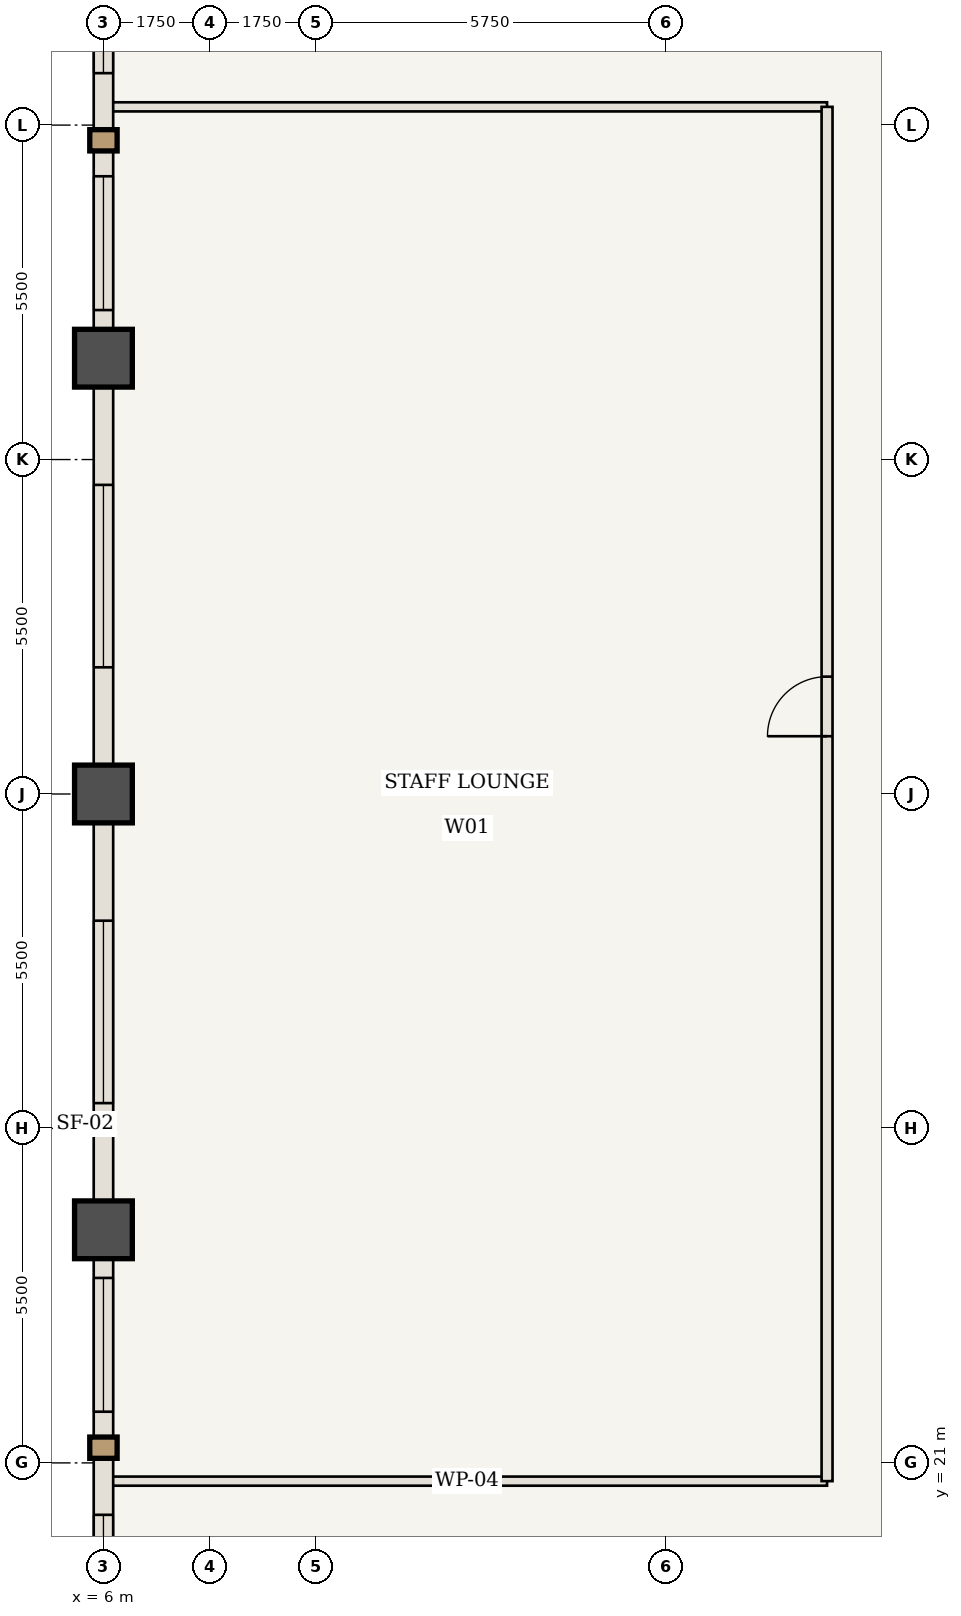
"""IFC4 building model, lengths in metres.
Left out: names, types, materials, properties, quantities, classifications, styles, units other than length and angle.
Written with IfcOpenShell. Run it as: python <this file> out.ifc"""

import sys

from ifc_helpers import new_model, si_unit, direction, frame, frame_2d, origin, origin_2d, place, context, subcontext, project, spatial, rectangle, extrude, element, fill, save


model = new_model("IFC4")
c1 = context("Model", 3, precision=1e-05, world=origin(), true_north=direction((0.0, 1.0)))
c2 = subcontext(c1, "Body", "Model", "MODEL_VIEW")
j1 = project(units=[si_unit("LENGTHUNIT", "METRE"), si_unit("PLANEANGLEUNIT", "RADIAN")], contexts=[c1])
p1 = place(None, origin())
s1 = spatial("IfcSite", under=j1, at=p1, CompositionType="ELEMENT")
p2 = place(p1, origin())
s2 = spatial("IfcBuilding", under=s1, at=p2, CompositionType="ELEMENT")
p3 = place(p2, frame((0.0, 0.0, 149.1)))
s3 = spatial("IfcBuildingStorey", under=s2, at=p3, CompositionType="ELEMENT", Elevation=149.1)
for number, where, z_axis, x_axis in (
    (1, (6.0, 24.833, 0.0), (0.0, 0.0, 1.0), (1.0, 0.0, 0.0)),
    (2, (6.0, 32.0, 0.0), (0.0, 0.0, 1.0), (1.0, 0.0, 0.0)),
    (3, (6.0, 39.167, 0.0), (0.0, 0.0, 1.0), (1.0, 0.0, 0.0)),
):
    element("IfcColumn", number, at=place(p3, frame(where, z_axis=z_axis, x_axis=x_axis)), inside=s3, PredefinedType="COLUMN", context=c2, shape_type="SweptSolid", body=[
        extrude(rectangle(XDim=0.95, YDim=0.95, at=origin_2d()), origin(), (0.0, 0.0, 1.0), 3.85),
    ])
for number, where, z_axis, x_axis in (
    (4, (6.06, 20.7, 0.0), (0.0, 0.0, 1.0), (1.0, 0.0, 0.0)),
    (5, (6.06, 43.3, 0.0), (0.0, 0.0, 1.0), (1.0, 0.0, 0.0)),
):
    element("IfcWall", number, at=place(p3, frame(where, z_axis=z_axis, x_axis=x_axis)), inside=s3, PredefinedType="STANDARD", context=c2, shape_type="SweptSolid", body=[
        extrude(rectangle(XDim=11.84, YDim=0.15, at=frame_2d((5.92, 0.0))), origin(), (0.0, 0.0, 1.0), 3.065),
    ])
p4 = place(p3, frame((17.9, 20.7, 0.0), z_axis=(0.0, 0.0, 1.0), x_axis=(0.0, 1.0, 0.0)))
e6 = element("IfcWall", 6, at=p4, inside=s3, PredefinedType="STANDARD", context=c2, shape_type="SweptSolid", body=[
    extrude(rectangle(XDim=22.6, YDim=0.18, at=frame_2d((11.3, 0.0))), origin(), (0.0, 0.0, 1.0), 3.685),
])
p5 = place(p4, frame((12.25, 0.0, 0.0)))
e7 = element("IfcOpeningElement", 7, at=p5, cuts=e6, PredefinedType="OPENING", context=c2, shape_type="SweptSolid", body=[
    extrude(rectangle(XDim=0.98, YDim=2.2, at=frame_2d((0.49, 1.1))), frame((0.0, 0.1, 0.0), z_axis=(0.0, -1.0, 0.0), x_axis=(1.0, 0.0, 0.0)), (0.0, 0.0, 1.0), 0.2),
])
p6 = place(p3, frame((6.0, 17.667, 0.0), z_axis=(0.0, 0.0, 1.0), x_axis=(0.0, 1.0, 0.0)))
e8 = element("IfcWall", 8, at=p6, inside=s3, PredefinedType="USERDEFINED", context=c2, shape_type="SweptSolid", body=[
    extrude(rectangle(XDim=7.167, YDim=0.32, at=frame_2d((3.583, 0.0))), origin(), (0.0, 0.0, 1.0), 2.885),
])
p7 = place(p6, frame((0.879, 0.0, 0.85)))
e9 = element("IfcOpeningElement", 9, at=p7, cuts=e8, PredefinedType="OPENING", context=c2, shape_type="SweptSolid", body=[
    extrude(rectangle(XDim=1.6, YDim=1.835, at=frame_2d((0.8, 0.917))), frame((0.0, 0.17, 0.0), z_axis=(0.0, -1.0, 0.0), x_axis=(1.0, 0.0, 0.0)), (0.0, 0.0, 1.0), 0.34),
])
p8 = place(p6, frame((4.175, 0.0, 0.85)))
e10 = element("IfcOpeningElement", 10, at=p8, cuts=e8, PredefinedType="OPENING", context=c2, shape_type="SweptSolid", body=[
    extrude(rectangle(XDim=2.2, YDim=1.835, at=frame_2d((1.1, 0.917))), frame((0.0, 0.17, 0.0), z_axis=(0.0, -1.0, 0.0), x_axis=(1.0, 0.0, 0.0)), (0.0, 0.0, 1.0), 0.34),
])
p9 = place(p3, frame((6.0, 24.833, 0.0), z_axis=(0.0, 0.0, 1.0), x_axis=(0.0, 1.0, 0.0)))
e11 = element("IfcWall", 11, at=p9, inside=s3, PredefinedType="USERDEFINED", context=c2, shape_type="SweptSolid", body=[
    extrude(rectangle(XDim=7.167, YDim=0.32, at=frame_2d((3.583, 0.0))), origin(), (0.0, 0.0, 1.0), 2.885),
])
p10 = place(p9, frame((2.083, 0.0, 0.85)))
e12 = element("IfcOpeningElement", 12, at=p10, cuts=e11, PredefinedType="OPENING", context=c2, shape_type="SweptSolid", body=[
    extrude(rectangle(XDim=3.0, YDim=1.835, at=frame_2d((1.5, 0.917))), frame((0.0, 0.17, 0.0), z_axis=(0.0, -1.0, 0.0), x_axis=(1.0, 0.0, 0.0)), (0.0, 0.0, 1.0), 0.34),
])
p11 = place(p3, frame((6.0, 32.0, 0.0), z_axis=(0.0, 0.0, 1.0), x_axis=(0.0, 1.0, 0.0)))
e13 = element("IfcWall", 13, at=p11, inside=s3, PredefinedType="USERDEFINED", context=c2, shape_type="SweptSolid", body=[
    extrude(rectangle(XDim=7.167, YDim=0.32, at=frame_2d((3.583, 0.0))), origin(), (0.0, 0.0, 1.0), 2.885),
])
p12 = place(p11, frame((2.083, 0.0, 0.85)))
e14 = element("IfcOpeningElement", 14, at=p12, cuts=e13, PredefinedType="OPENING", context=c2, shape_type="SweptSolid", body=[
    extrude(rectangle(XDim=3.0, YDim=1.835, at=frame_2d((1.5, 0.917))), frame((0.0, 0.17, 0.0), z_axis=(0.0, -1.0, 0.0), x_axis=(1.0, 0.0, 0.0)), (0.0, 0.0, 1.0), 0.34),
])
p13 = place(p3, frame((6.0, 39.167, 0.0), z_axis=(0.0, 0.0, 1.0), x_axis=(0.0, 1.0, 0.0)))
e15 = element("IfcWall", 15, at=p13, inside=s3, PredefinedType="USERDEFINED", context=c2, shape_type="SweptSolid", body=[
    extrude(rectangle(XDim=7.167, YDim=0.32, at=frame_2d((3.583, 0.0))), origin(), (0.0, 0.0, 1.0), 2.885),
])
p14 = place(p13, frame((0.792, 0.0, 0.85)))
e16 = element("IfcOpeningElement", 16, at=p14, cuts=e15, PredefinedType="OPENING", context=c2, shape_type="SweptSolid", body=[
    extrude(rectangle(XDim=2.2, YDim=1.835, at=frame_2d((1.1, 0.917))), frame((0.0, 0.17, 0.0), z_axis=(0.0, -1.0, 0.0), x_axis=(1.0, 0.0, 0.0)), (0.0, 0.0, 1.0), 0.34),
])
p15 = place(p13, frame((4.688, 0.0, 0.85)))
e17 = element("IfcOpeningElement", 17, at=p15, cuts=e15, PredefinedType="OPENING", context=c2, shape_type="SweptSolid", body=[
    extrude(rectangle(XDim=1.6, YDim=1.835, at=frame_2d((0.8, 0.917))), frame((0.0, 0.17, 0.0), z_axis=(0.0, -1.0, 0.0), x_axis=(1.0, 0.0, 0.0)), (0.0, 0.0, 1.0), 0.34),
])
p16 = place(p5, origin())
e18 = element("IfcDoor", 18, at=p16, inside=s3, OperationType="SINGLE_SWING_LEFT", PredefinedType="DOOR", context=c2, shape_type="SweptSolid", body=[
    extrude(rectangle(XDim=0.98, YDim=2.2, at=frame_2d((0.49, 1.1))), frame((0.0, 0.025, 0.0), z_axis=(0.0, -1.0, 0.0), x_axis=(1.0, 0.0, 0.0)), (0.0, 0.0, 1.0), 0.05),
])
fill(e7, e18)
p17 = place(p7, origin())
e19 = element("IfcWindow", 19, at=p17, inside=s3, PartitioningType="SINGLE_PANEL", PredefinedType="WINDOW", context=c2, shape_type="SweptSolid", body=[
    extrude(rectangle(XDim=1.6, YDim=1.835, at=frame_2d((0.8, 0.917))), frame((0.0, 0.03, 0.0), z_axis=(0.0, -1.0, 0.0), x_axis=(1.0, 0.0, 0.0)), (0.0, 0.0, 1.0), 0.06),
])
fill(e9, e19)
p18 = place(p8, origin())
e20 = element("IfcWindow", 20, at=p18, inside=s3, PartitioningType="SINGLE_PANEL", PredefinedType="WINDOW", context=c2, shape_type="SweptSolid", body=[
    extrude(rectangle(XDim=2.2, YDim=1.835, at=frame_2d((1.1, 0.917))), frame((0.0, 0.03, 0.0), z_axis=(0.0, -1.0, 0.0), x_axis=(1.0, 0.0, 0.0)), (0.0, 0.0, 1.0), 0.06),
])
fill(e10, e20)
p19 = place(p10, origin())
e21 = element("IfcWindow", 21, at=p19, inside=s3, PartitioningType="SINGLE_PANEL", PredefinedType="WINDOW", context=c2, shape_type="SweptSolid", body=[
    extrude(rectangle(XDim=3.0, YDim=1.835, at=frame_2d((1.5, 0.917))), frame((0.0, 0.03, 0.0), z_axis=(0.0, -1.0, 0.0), x_axis=(1.0, 0.0, 0.0)), (0.0, 0.0, 1.0), 0.06),
])
fill(e12, e21)
p20 = place(p12, origin())
e22 = element("IfcWindow", 22, at=p20, inside=s3, PartitioningType="SINGLE_PANEL", PredefinedType="WINDOW", context=c2, shape_type="SweptSolid", body=[
    extrude(rectangle(XDim=3.0, YDim=1.835, at=frame_2d((1.5, 0.917))), frame((0.0, 0.03, 0.0), z_axis=(0.0, -1.0, 0.0), x_axis=(1.0, 0.0, 0.0)), (0.0, 0.0, 1.0), 0.06),
])
fill(e14, e22)
p21 = place(p14, origin())
e23 = element("IfcWindow", 23, at=p21, inside=s3, PartitioningType="SINGLE_PANEL", PredefinedType="WINDOW", context=c2, shape_type="SweptSolid", body=[
    extrude(rectangle(XDim=2.2, YDim=1.835, at=frame_2d((1.1, 0.917))), frame((0.0, 0.03, 0.0), z_axis=(0.0, -1.0, 0.0), x_axis=(1.0, 0.0, 0.0)), (0.0, 0.0, 1.0), 0.06),
])
fill(e16, e23)
p22 = place(p15, origin())
e24 = element("IfcWindow", 24, at=p22, inside=s3, PartitioningType="SINGLE_PANEL", PredefinedType="WINDOW", context=c2, shape_type="SweptSolid", body=[
    extrude(rectangle(XDim=1.6, YDim=1.835, at=frame_2d((0.8, 0.917))), frame((0.0, 0.03, 0.0), z_axis=(0.0, -1.0, 0.0), x_axis=(1.0, 0.0, 0.0)), (0.0, 0.0, 1.0), 0.06),
])
fill(e17, e24)
save(model, sys.argv[1])
